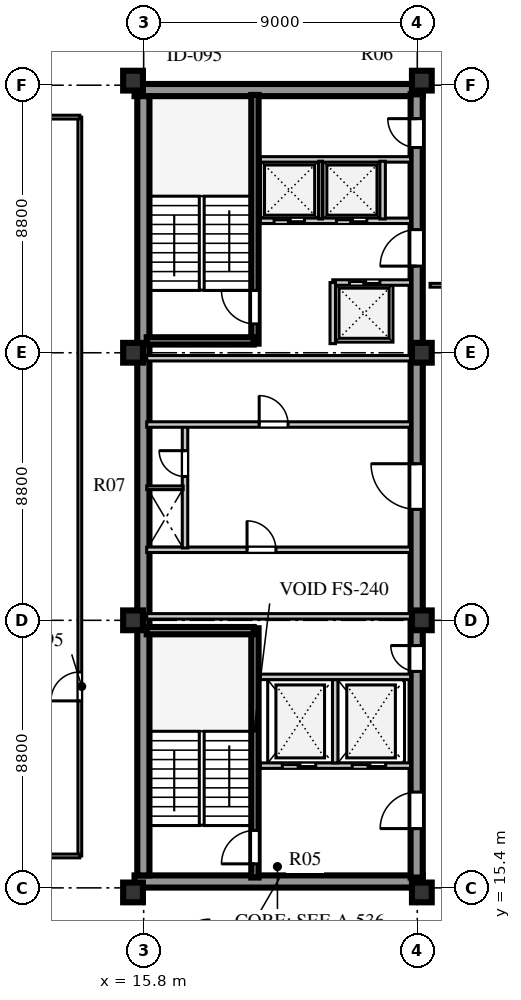
"""IFC4 building model, lengths in metres.
Left out: names, types, materials, properties, quantities, classifications, styles, units other than length and angle.
Written with IfcOpenShell. Run it as: python <this file> out.ifc"""

import sys

from ifc_helpers import new_model, si_unit, direction, frame, frame_2d, origin, origin_2d, place, context, subcontext, project, spatial, rectangle, extrude, element, fill, save


model = new_model("IFC4")
c1 = context("Model", 3, precision=1e-05, world=origin(), true_north=direction((0.0, 1.0)))
c2 = subcontext(c1, "Body", "Model", "MODEL_VIEW")
j1 = project(units=[si_unit("LENGTHUNIT", "METRE"), si_unit("PLANEANGLEUNIT", "RADIAN")], contexts=[c1])
p1 = place(None, origin())
s1 = spatial("IfcSite", under=j1, at=p1, CompositionType="ELEMENT")
p2 = place(p1, origin())
s2 = spatial("IfcBuilding", under=s1, at=p2, CompositionType="ELEMENT")
p3 = place(p2, frame((0.0, 0.0, 280.4)))
s3 = spatial("IfcBuildingStorey", under=s2, at=p3, CompositionType="ELEMENT", Elevation=280.4)
for number, where, z_axis, x_axis in (
    (1, (15.5, 15.61, 0.0), (0.0, 0.0, 1.0), (1.0, 0.0, 0.0)),
    (2, (15.5, 41.64, 0.0), (0.0, 0.0, 1.0), (1.0, 0.0, 0.0)),
):
    element("IfcWall", number, at=place(p3, frame(where, z_axis=z_axis, x_axis=x_axis)), inside=s3, PredefinedType="SHEAR", context=c2, shape_type="SweptSolid", body=[
        extrude(rectangle(XDim=9.48, YDim=0.4, at=frame_2d((4.74, 0.0))), origin(), (0.0, 0.0, 1.0), 3.66),
    ])
p4 = place(p3, frame((15.79, 15.81, 0.0), z_axis=(0.0, 0.0, 1.0), x_axis=(0.0, 1.0, 0.0)))
e3 = element("IfcWall", 3, at=p4, inside=s3, PredefinedType="SHEAR", context=c2, shape_type="SweptSolid", body=[
    extrude(rectangle(XDim=25.63, YDim=0.4, at=frame_2d((12.815, 0.0))), origin(), (0.0, 0.0, 1.0), 3.66),
])
p5 = place(p3, frame((24.78, 15.74, 0.0), z_axis=(0.0, 0.0, 1.0), x_axis=(0.0, 1.0, 0.0)))
e4 = element("IfcWall", 4, at=p5, inside=s3, PredefinedType="SHEAR", context=c2, shape_type="SweptSolid", body=[
    extrude(rectangle(XDim=25.76, YDim=0.4, at=frame_2d((12.88, 0.0))), origin(), (0.0, 0.0, 1.0), 3.66),
])
p6 = place(p5, frame((1.61, 0.0, 0.0)))
e5 = element("IfcOpeningElement", 5, at=p6, cuts=e4, PredefinedType="OPENING", context=c2, shape_type="SweptSolid", body=[
    extrude(rectangle(XDim=1.2, YDim=2.1, at=frame_2d((0.6, 1.05))), frame((0.0, 0.21, 0.0), z_axis=(0.0, -1.0, 0.0), x_axis=(1.0, 0.0, 0.0)), (0.0, 0.0, 1.0), 0.42),
])
p7 = place(p5, frame((6.78, 0.0, 0.0)))
e6 = element("IfcOpeningElement", 6, at=p7, cuts=e4, PredefinedType="OPENING", context=c2, shape_type="SweptSolid", body=[
    extrude(rectangle(XDim=0.85, YDim=2.06, at=frame_2d((0.425, 1.03))), frame((0.0, 0.21, 0.0), z_axis=(0.0, -1.0, 0.0), x_axis=(1.0, 0.0, 0.0)), (0.0, 0.0, 1.0), 0.42),
])
p8 = place(p5, frame((12.11, 0.0, 0.0)))
e7 = element("IfcOpeningElement", 7, at=p8, cuts=e4, PredefinedType="OPENING", context=c2, shape_type="SweptSolid", body=[
    extrude(rectangle(XDim=1.5, YDim=2.12, at=frame_2d((0.75, 1.06))), frame((0.0, 0.21, 0.0), z_axis=(0.0, -1.0, 0.0), x_axis=(1.0, 0.0, 0.0)), (0.0, 0.0, 1.0), 0.42),
])
p9 = place(p5, frame((20.11, 0.0, 0.0)))
e8 = element("IfcOpeningElement", 8, at=p9, cuts=e4, PredefinedType="OPENING", context=c2, shape_type="SweptSolid", body=[
    extrude(rectangle(XDim=1.2, YDim=2.12, at=frame_2d((0.6, 1.06))), frame((0.0, 0.21, 0.0), z_axis=(0.0, -1.0, 0.0), x_axis=(1.0, 0.0, 0.0)), (0.0, 0.0, 1.0), 0.42),
])
p10 = place(p5, frame((24.01, 0.0, 0.0)))
e9 = element("IfcOpeningElement", 9, at=p10, cuts=e4, PredefinedType="OPENING", context=c2, shape_type="SweptSolid", body=[
    extrude(rectangle(XDim=0.95, YDim=2.1, at=frame_2d((0.475, 1.05))), frame((0.0, 0.21, 0.0), z_axis=(0.0, -1.0, 0.0), x_axis=(1.0, 0.0, 0.0)), (0.0, 0.0, 1.0), 0.42),
])
for number, where, z_axis, x_axis in (
    (10, (15.45, 15.25, 0.0), (0.0, 0.0, 1.0), (1.0, 0.0, 0.0)),
    (11, (15.45, 24.2, 0.0), (0.0, 0.0, 1.0), (1.0, 0.0, 0.0)),
    (12, (15.45, 33.0, 0.0), (0.0, 0.0, 1.0), (1.0, 0.0, 0.0)),
    (13, (15.45, 41.95, 0.0), (0.0, 0.0, 1.0), (1.0, 0.0, 0.0)),
    (14, (24.95, 15.25, 0.0), (0.0, 0.0, 1.0), (1.0, 0.0, 0.0)),
    (15, (24.95, 24.2, 0.0), (0.0, 0.0, 1.0), (1.0, 0.0, 0.0)),
    (16, (24.95, 33.0, 0.0), (0.0, 0.0, 1.0), (1.0, 0.0, 0.0)),
    (17, (24.95, 41.95, 0.0), (0.0, 0.0, 1.0), (1.0, 0.0, 0.0)),
):
    element("IfcColumn", number, at=place(p3, frame(where, z_axis=z_axis, x_axis=x_axis)), inside=s3, PredefinedType="COLUMN", context=c2, shape_type="SweptSolid", body=[
        extrude(rectangle(XDim=0.65, YDim=0.65, at=origin_2d()), origin(), (0.0, 0.0, 1.0), 3.66),
    ])
p11 = place(p3, frame((19.46, 15.74, 0.0), z_axis=(0.0, 0.0, 1.0), x_axis=(0.0, 1.0, 0.0)))
e18 = element("IfcWall", 18, at=p11, inside=s3, PredefinedType="SHEAR", context=c2, shape_type="SweptSolid", body=[
    extrude(rectangle(XDim=8.2, YDim=0.24, at=frame_2d((4.1, 0.0))), origin(), (0.0, 0.0, 1.0), 3.9),
])
p12 = place(p11, frame((0.45, 0.0, 0.0)))
e19 = element("IfcOpeningElement", 19, at=p12, cuts=e18, PredefinedType="OPENING", context=c2, shape_type="SweptSolid", body=[
    extrude(rectangle(XDim=1.1, YDim=2.1, at=frame_2d((0.55, 1.05))), frame((0.0, 0.13, 0.0), z_axis=(0.0, -1.0, 0.0), x_axis=(1.0, 0.0, 0.0)), (0.0, 0.0, 1.0), 0.26),
])
p13 = place(p3, frame((15.9, 23.86, 0.0), z_axis=(0.0, 0.0, 1.0), x_axis=(1.0, 0.0, 0.0)))
e20 = element("IfcWall", 20, at=p13, inside=s3, PredefinedType="SHEAR", context=c2, shape_type="SweptSolid", body=[
    extrude(rectangle(XDim=3.52, YDim=0.24, at=frame_2d((1.76, 0.0))), origin(), (0.0, 0.0, 1.0), 3.9),
])
p14 = place(p3, frame((19.64, 19.42, 0.0), z_axis=(0.0, 0.0, 1.0), x_axis=(1.0, 0.0, 0.0)))
e21 = element("IfcWall", 21, at=p14, inside=s3, PredefinedType="SOLIDWALL", context=c2, shape_type="SweptSolid", body=[
    extrude(rectangle(XDim=4.94, YDim=0.18, at=frame_2d((2.47, 0.0))), origin(), (0.0, 0.0, 1.0), 3.66),
])
p15 = place(p14, frame((0.72, 0.0, 0.0)))
e22 = element("IfcOpeningElement", 22, at=p15, cuts=e21, PredefinedType="OPENING", context=c2, shape_type="SweptSolid", body=[
    extrude(rectangle(XDim=1.1, YDim=2.1, at=frame_2d((0.55, 1.05))), frame((0.0, 0.1, 0.0), z_axis=(0.0, -1.0, 0.0), x_axis=(1.0, 0.0, 0.0)), (0.0, 0.0, 1.0), 0.2),
])
p16 = place(p14, frame((3.02, 0.0, 0.0)))
e23 = element("IfcOpeningElement", 23, at=p16, cuts=e21, PredefinedType="OPENING", context=c2, shape_type="SweptSolid", body=[
    extrude(rectangle(XDim=1.1, YDim=2.1, at=frame_2d((0.55, 1.05))), frame((0.0, 0.1, 0.0), z_axis=(0.0, -1.0, 0.0), x_axis=(1.0, 0.0, 0.0)), (0.0, 0.0, 1.0), 0.2),
])
p17 = place(p3, frame((22.1, 19.51, 0.0), z_axis=(0.0, 0.0, 1.0), x_axis=(0.0, 1.0, 0.0)))
e24 = element("IfcWall", 24, at=p17, inside=s3, PredefinedType="SOLIDWALL", context=c2, shape_type="SweptSolid", body=[
    extrude(rectangle(XDim=2.74, YDim=0.18, at=frame_2d((1.37, 0.0))), origin(), (0.0, 0.0, 1.0), 3.66),
])
p18 = place(p3, frame((19.64, 22.34, 0.0), z_axis=(0.0, 0.0, 1.0), x_axis=(1.0, 0.0, 0.0)))
e25 = element("IfcWall", 25, at=p18, inside=s3, PredefinedType="SOLIDWALL", context=c2, shape_type="SweptSolid", body=[
    extrude(rectangle(XDim=4.94, YDim=0.18, at=frame_2d((2.47, 0.0))), origin(), (0.0, 0.0, 1.0), 3.66),
])
p19 = place(p3, frame((15.9, 26.52, 0.0), z_axis=(0.0, 0.0, 1.0), x_axis=(1.0, 0.0, 0.0)))
e26 = element("IfcWall", 26, at=p19, inside=s3, PredefinedType="SOLIDWALL", context=c2, shape_type="SweptSolid", body=[
    extrude(rectangle(XDim=8.68, YDim=0.18, at=frame_2d((4.34, 0.0))), origin(), (0.0, 0.0, 1.0), 3.66),
])
p20 = place(p19, frame((3.3, 0.0, 0.0)))
e27 = element("IfcOpeningElement", 27, at=p20, cuts=e26, PredefinedType="OPENING", context=c2, shape_type="SweptSolid", body=[
    extrude(rectangle(XDim=0.95, YDim=2.1, at=frame_2d((0.475, 1.05))), frame((0.0, 0.1, 0.0), z_axis=(0.0, -1.0, 0.0), x_axis=(1.0, 0.0, 0.0)), (0.0, 0.0, 1.0), 0.2),
])
p21 = place(p3, frame((15.9, 24.33, 0.0), z_axis=(0.0, 0.0, 1.0), x_axis=(1.0, 0.0, 0.0)))
e28 = element("IfcWall", 28, at=p21, inside=s3, PredefinedType="SOLIDWALL", context=c2, shape_type="SweptSolid", body=[
    extrude(rectangle(XDim=8.68, YDim=0.18, at=frame_2d((4.34, 0.0))), origin(), (0.0, 0.0, 1.0), 3.06),
])
p22 = place(p3, frame((17.16, 26.58, 0.0), z_axis=(0.0, 0.0, 1.0), x_axis=(0.0, 1.0, 0.0)))
e29 = element("IfcWall", 29, at=p22, inside=s3, PredefinedType="SOLIDWALL", context=c2, shape_type="SweptSolid", body=[
    extrude(rectangle(XDim=4.02, YDim=0.18, at=frame_2d((2.01, 0.0))), origin(), (0.0, 0.0, 1.0), 3.66),
])
p23 = place(p22, frame((2.35, 0.0, 0.0)))
e30 = element("IfcOpeningElement", 30, at=p23, cuts=e29, PredefinedType="OPENING", context=c2, shape_type="SweptSolid", body=[
    extrude(rectangle(XDim=0.85, YDim=2.06, at=frame_2d((0.425, 1.03))), frame((0.0, 0.1, 0.0), z_axis=(0.0, -1.0, 0.0), x_axis=(1.0, 0.0, 0.0)), (0.0, 0.0, 1.0), 0.2),
])
p24 = place(p3, frame((15.9, 28.56, 0.0), z_axis=(0.0, 0.0, 1.0), x_axis=(1.0, 0.0, 0.0)))
e31 = element("IfcWall", 31, at=p24, inside=s3, PredefinedType="PARTITIONING", context=c2, shape_type="SweptSolid", body=[
    extrude(rectangle(XDim=1.2, YDim=0.12, at=frame_2d((0.6, 0.0))), origin(), (0.0, 0.0, 1.0), 3.66),
])
p25 = place(p3, frame((15.9, 30.64, 0.0), z_axis=(0.0, 0.0, 1.0), x_axis=(1.0, 0.0, 0.0)))
e32 = element("IfcWall", 32, at=p25, inside=s3, PredefinedType="SOLIDWALL", context=c2, shape_type="SweptSolid", body=[
    extrude(rectangle(XDim=8.68, YDim=0.18, at=frame_2d((4.34, 0.0))), origin(), (0.0, 0.0, 1.0), 3.66),
])
p26 = place(p25, frame((3.7, 0.0, 0.0)))
e33 = element("IfcOpeningElement", 33, at=p26, cuts=e32, PredefinedType="OPENING", context=c2, shape_type="SweptSolid", body=[
    extrude(rectangle(XDim=0.95, YDim=2.1, at=frame_2d((0.475, 1.05))), frame((0.0, 0.1, 0.0), z_axis=(0.0, -1.0, 0.0), x_axis=(1.0, 0.0, 0.0)), (0.0, 0.0, 1.0), 0.2),
])
p27 = place(p3, frame((15.9, 32.82, 0.0), z_axis=(0.0, 0.0, 1.0), x_axis=(1.0, 0.0, 0.0)))
e34 = element("IfcWall", 34, at=p27, inside=s3, PredefinedType="SOLIDWALL", context=c2, shape_type="SweptSolid", body=[
    extrude(rectangle(XDim=8.68, YDim=0.18, at=frame_2d((4.34, 0.0))), origin(), (0.0, 0.0, 1.0), 3.06),
])
p28 = place(p3, frame((19.46, 33.3, 0.0), z_axis=(0.0, 0.0, 1.0), x_axis=(0.0, 1.0, 0.0)))
e35 = element("IfcWall", 35, at=p28, inside=s3, PredefinedType="SHEAR", context=c2, shape_type="SweptSolid", body=[
    extrude(rectangle(XDim=8.18, YDim=0.24, at=frame_2d((4.09, 0.0))), origin(), (0.0, 0.0, 1.0), 3.9),
])
p29 = place(p28, frame((0.65, 0.0, 0.0)))
e36 = element("IfcOpeningElement", 36, at=p29, cuts=e35, PredefinedType="OPENING", context=c2, shape_type="SweptSolid", body=[
    extrude(rectangle(XDim=1.1, YDim=2.1, at=frame_2d((0.55, 1.05))), frame((0.0, 0.13, 0.0), z_axis=(0.0, -1.0, 0.0), x_axis=(1.0, 0.0, 0.0)), (0.0, 0.0, 1.0), 0.26),
])
p30 = place(p3, frame((15.9, 33.39, 0.0), z_axis=(0.0, 0.0, 1.0), x_axis=(1.0, 0.0, 0.0)))
e37 = element("IfcWall", 37, at=p30, inside=s3, PredefinedType="SHEAR", context=c2, shape_type="SweptSolid", body=[
    extrude(rectangle(XDim=3.52, YDim=0.24, at=frame_2d((1.76, 0.0))), origin(), (0.0, 0.0, 1.0), 3.9),
])
p31 = place(p3, frame((22.02, 35.31, 0.0), z_axis=(0.0, 0.0, 1.0), x_axis=(1.0, 0.0, 0.0)))
e38 = element("IfcWall", 38, at=p31, inside=s3, PredefinedType="SOLIDWALL", context=c2, shape_type="SweptSolid", body=[
    extrude(rectangle(XDim=2.56, YDim=0.18, at=frame_2d((1.28, 0.0))), origin(), (0.0, 0.0, 1.0), 3.66),
])
p32 = place(p31, frame((0.55, 0.0, 0.0)))
e39 = element("IfcOpeningElement", 39, at=p32, cuts=e38, PredefinedType="OPENING", context=c2, shape_type="SweptSolid", body=[
    extrude(rectangle(XDim=1.0, YDim=2.1, at=frame_2d((0.5, 1.05))), frame((0.0, 0.1, 0.0), z_axis=(0.0, -1.0, 0.0), x_axis=(1.0, 0.0, 0.0)), (0.0, 0.0, 1.0), 0.2),
])
p33 = place(p3, frame((22.02, 33.3, 0.0), z_axis=(0.0, 0.0, 1.0), x_axis=(0.0, 1.0, 0.0)))
e40 = element("IfcWall", 40, at=p33, inside=s3, PredefinedType="SOLIDWALL", context=c2, shape_type="SweptSolid", body=[
    extrude(rectangle(XDim=2.01, YDim=0.18, at=frame_2d((1.005, 0.0))), origin(), (0.0, 0.0, 1.0), 3.66),
])
p34 = place(p3, frame((19.64, 37.34, 0.0), z_axis=(0.0, 0.0, 1.0), x_axis=(1.0, 0.0, 0.0)))
e41 = element("IfcWall", 41, at=p34, inside=s3, PredefinedType="SOLIDWALL", context=c2, shape_type="SweptSolid", body=[
    extrude(rectangle(XDim=4.94, YDim=0.18, at=frame_2d((2.47, 0.0))), origin(), (0.0, 0.0, 1.0), 3.66),
])
p35 = place(p34, frame((0.45, 0.0, 0.0)))
e42 = element("IfcOpeningElement", 42, at=p35, cuts=e41, PredefinedType="OPENING", context=c2, shape_type="SweptSolid", body=[
    extrude(rectangle(XDim=1.0, YDim=2.1, at=frame_2d((0.5, 1.05))), frame((0.0, 0.1, 0.0), z_axis=(0.0, -1.0, 0.0), x_axis=(1.0, 0.0, 0.0)), (0.0, 0.0, 1.0), 0.2),
])
p36 = place(p34, frame((2.5, 0.0, 0.0)))
e43 = element("IfcOpeningElement", 43, at=p36, cuts=e41, PredefinedType="OPENING", context=c2, shape_type="SweptSolid", body=[
    extrude(rectangle(XDim=1.0, YDim=2.1, at=frame_2d((0.5, 1.05))), frame((0.0, 0.1, 0.0), z_axis=(0.0, -1.0, 0.0), x_axis=(1.0, 0.0, 0.0)), (0.0, 0.0, 1.0), 0.2),
])
p37 = place(p3, frame((19.64, 39.36, 0.0), z_axis=(0.0, 0.0, 1.0), x_axis=(1.0, 0.0, 0.0)))
e44 = element("IfcWall", 44, at=p37, inside=s3, PredefinedType="SOLIDWALL", context=c2, shape_type="SweptSolid", body=[
    extrude(rectangle(XDim=4.94, YDim=0.18, at=frame_2d((2.47, 0.0))), origin(), (0.0, 0.0, 1.0), 3.66),
])
p38 = place(p3, frame((21.62, 37.4, 0.0), z_axis=(0.0, 0.0, 1.0), x_axis=(0.0, 1.0, 0.0)))
e45 = element("IfcWall", 45, at=p38, inside=s3, PredefinedType="PARTITIONING", context=c2, shape_type="SweptSolid", body=[
    extrude(rectangle(XDim=1.9, YDim=0.12, at=frame_2d((0.95, 0.0))), origin(), (0.0, 0.0, 1.0), 3.66),
])
p39 = place(p3, frame((23.66, 37.4, 0.0), z_axis=(0.0, 0.0, 1.0), x_axis=(0.0, 1.0, 0.0)))
e46 = element("IfcWall", 46, at=p39, inside=s3, PredefinedType="SOLIDWALL", context=c2, shape_type="SweptSolid", body=[
    extrude(rectangle(XDim=1.9, YDim=0.18, at=frame_2d((0.95, 0.0))), origin(), (0.0, 0.0, 1.0), 3.66),
])
p40 = place(p3, frame((25.22, 35.22, 0.0), z_axis=(0.0, 0.0, 1.0), x_axis=(1.0, 0.0, 0.0)))
e47 = element("IfcWall", 47, at=p40, inside=s3, PredefinedType="PLUMBINGWALL", context=c2, shape_type="SweptSolid", body=[
    extrude(rectangle(XDim=9.5, YDim=0.125, at=frame_2d((4.75, 0.0))), origin(), (0.0, 0.0, 1.0), 3.66),
])
p41 = place(p40, frame((1.8, 0.0, 0.0)))
e48 = element("IfcOpeningElement", 48, at=p41, cuts=e47, PredefinedType="OPENING", context=c2, shape_type="SweptSolid", body=[
    extrude(rectangle(XDim=1.1, YDim=2.08, at=frame_2d((0.55, 1.04))), frame((0.0, 0.073, 0.0), z_axis=(0.0, -1.0, 0.0), x_axis=(1.0, 0.0, 0.0)), (0.0, 0.0, 1.0), 0.145),
])
p42 = place(p3, frame((13.7, 16.45, 0.0), z_axis=(0.0, 0.0, 1.0), x_axis=(0.0, 1.0, 0.0)))
e49 = element("IfcWall", 49, at=p42, inside=s3, PredefinedType="PLUMBINGWALL", context=c2, shape_type="SweptSolid", body=[
    extrude(rectangle(XDim=24.3, YDim=0.125, at=frame_2d((12.15, 0.0))), origin(), (0.0, 0.0, 1.0), 3.66),
])
p43 = place(p42, frame((5.1, 0.0, 0.0)))
e50 = element("IfcOpeningElement", 50, at=p43, cuts=e49, PredefinedType="OPENING", context=c2, shape_type="SweptSolid", body=[
    extrude(rectangle(XDim=0.95, YDim=2.08, at=frame_2d((0.475, 1.04))), frame((0.0, 0.073, 0.0), z_axis=(0.0, -1.0, 0.0), x_axis=(1.0, 0.0, 0.0)), (0.0, 0.0, 1.0), 0.145),
])
for number, where, z_axis, x_axis in (
    (51, (10.68, 16.45, 0.0), (0.0, 0.0, 1.0), (1.0, 0.0, 0.0)),
    (52, (10.68, 40.75, 0.0), (0.0, 0.0, 1.0), (1.0, 0.0, 0.0)),
):
    element("IfcWall", number, at=place(p3, frame(where, z_axis=z_axis, x_axis=x_axis)), inside=s3, PredefinedType="PLUMBINGWALL", context=c2, shape_type="SweptSolid", body=[
        extrude(rectangle(XDim=3.02, YDim=0.125, at=frame_2d((1.51, 0.0))), origin(), (0.0, 0.0, 1.0), 3.66),
    ])
p44 = place(p12, origin())
e53 = element("IfcDoor", 53, at=p44, inside=s3, OperationType="SINGLE_SWING_LEFT", PredefinedType="DOOR", context=c2, shape_type="SweptSolid", body=[
    extrude(rectangle(XDim=1.1, YDim=2.1, at=frame_2d((0.55, 1.05))), frame((0.0, 0.025, 0.0), z_axis=(0.0, -1.0, 0.0), x_axis=(1.0, 0.0, 0.0)), (0.0, 0.0, 1.0), 0.05),
])
fill(e19, e53)
p45 = place(p15, origin())
e54 = element("IfcDoor", 54, at=p45, inside=s3, OperationType="DOUBLE_DOOR_SLIDING", PredefinedType="DOOR", context=c2, shape_type="SweptSolid", body=[
    extrude(rectangle(XDim=1.1, YDim=2.1, at=frame_2d((0.55, 1.05))), frame((0.0, 0.025, 0.0), z_axis=(0.0, -1.0, 0.0), x_axis=(1.0, 0.0, 0.0)), (0.0, 0.0, 1.0), 0.05),
])
fill(e22, e54)
p46 = place(p16, origin())
e55 = element("IfcDoor", 55, at=p46, inside=s3, OperationType="DOUBLE_DOOR_SLIDING", PredefinedType="DOOR", context=c2, shape_type="SweptSolid", body=[
    extrude(rectangle(XDim=1.1, YDim=2.1, at=frame_2d((0.55, 1.05))), frame((0.0, 0.025, 0.0), z_axis=(0.0, -1.0, 0.0), x_axis=(1.0, 0.0, 0.0)), (0.0, 0.0, 1.0), 0.05),
])
fill(e23, e55)
p47 = place(p6, frame((1.2, 0.0, 0.0), z_axis=(0.0, 0.0, 1.0), x_axis=(-1.0, 0.0, 0.0)))
e56 = element("IfcDoor", 56, at=p47, inside=s3, OperationType="SINGLE_SWING_RIGHT", PredefinedType="DOOR", context=c2, shape_type="SweptSolid", body=[
    extrude(rectangle(XDim=1.2, YDim=2.1, at=frame_2d((0.6, 1.05))), frame((0.0, 0.025, 0.0), z_axis=(0.0, -1.0, 0.0), x_axis=(1.0, 0.0, 0.0)), (0.0, 0.0, 1.0), 0.05),
])
fill(e5, e56)
p48 = place(p7, frame((0.85, 0.0, 0.0), z_axis=(0.0, 0.0, 1.0), x_axis=(-1.0, 0.0, 0.0)))
e57 = element("IfcDoor", 57, at=p48, inside=s3, OperationType="SINGLE_SWING_LEFT", PredefinedType="DOOR", context=c2, shape_type="SweptSolid", body=[
    extrude(rectangle(XDim=0.85, YDim=2.06, at=frame_2d((0.425, 1.03))), frame((0.0, 0.025, 0.0), z_axis=(0.0, -1.0, 0.0), x_axis=(1.0, 0.0, 0.0)), (0.0, 0.0, 1.0), 0.05),
])
fill(e6, e57)
p49 = place(p20, origin())
e58 = element("IfcDoor", 58, at=p49, inside=s3, OperationType="SINGLE_SWING_LEFT", PredefinedType="DOOR", context=c2, shape_type="SweptSolid", body=[
    extrude(rectangle(XDim=0.95, YDim=2.1, at=frame_2d((0.475, 1.05))), frame((0.0, 0.025, 0.0), z_axis=(0.0, -1.0, 0.0), x_axis=(1.0, 0.0, 0.0)), (0.0, 0.0, 1.0), 0.05),
])
fill(e27, e58)
p50 = place(p23, origin())
e59 = element("IfcDoor", 59, at=p50, inside=s3, OperationType="SINGLE_SWING_RIGHT", PredefinedType="DOOR", context=c2, shape_type="SweptSolid", body=[
    extrude(rectangle(XDim=0.85, YDim=2.06, at=frame_2d((0.425, 1.03))), frame((0.0, 0.025, 0.0), z_axis=(0.0, -1.0, 0.0), x_axis=(1.0, 0.0, 0.0)), (0.0, 0.0, 1.0), 0.05),
])
fill(e30, e59)
p51 = place(p8, frame((1.5, 0.0, 0.0), z_axis=(0.0, 0.0, 1.0), x_axis=(-1.0, 0.0, 0.0)))
e60 = element("IfcDoor", 60, at=p51, inside=s3, OperationType="SINGLE_SWING_LEFT", PredefinedType="DOOR", context=c2, shape_type="SweptSolid", body=[
    extrude(rectangle(XDim=1.5, YDim=2.12, at=frame_2d((0.75, 1.06))), frame((0.0, 0.025, 0.0), z_axis=(0.0, -1.0, 0.0), x_axis=(1.0, 0.0, 0.0)), (0.0, 0.0, 1.0), 0.05),
])
fill(e7, e60)
p52 = place(p26, frame((0.95, 0.0, 0.0), z_axis=(0.0, 0.0, 1.0), x_axis=(-1.0, 0.0, 0.0)))
e61 = element("IfcDoor", 61, at=p52, inside=s3, OperationType="SINGLE_SWING_RIGHT", PredefinedType="DOOR", context=c2, shape_type="SweptSolid", body=[
    extrude(rectangle(XDim=0.95, YDim=2.1, at=frame_2d((0.475, 1.05))), frame((0.0, 0.025, 0.0), z_axis=(0.0, -1.0, 0.0), x_axis=(1.0, 0.0, 0.0)), (0.0, 0.0, 1.0), 0.05),
])
fill(e33, e61)
p53 = place(p29, origin())
e62 = element("IfcDoor", 62, at=p53, inside=s3, OperationType="SINGLE_SWING_RIGHT", PredefinedType="DOOR", context=c2, shape_type="SweptSolid", body=[
    extrude(rectangle(XDim=1.1, YDim=2.1, at=frame_2d((0.55, 1.05))), frame((0.0, 0.025, 0.0), z_axis=(0.0, -1.0, 0.0), x_axis=(1.0, 0.0, 0.0)), (0.0, 0.0, 1.0), 0.05),
])
fill(e36, e62)
p54 = place(p9, frame((1.2, 0.0, 0.0), z_axis=(0.0, 0.0, 1.0), x_axis=(-1.0, 0.0, 0.0)))
e63 = element("IfcDoor", 63, at=p54, inside=s3, OperationType="SINGLE_SWING_RIGHT", PredefinedType="DOOR", context=c2, shape_type="SweptSolid", body=[
    extrude(rectangle(XDim=1.2, YDim=2.12, at=frame_2d((0.6, 1.06))), frame((0.0, 0.025, 0.0), z_axis=(0.0, -1.0, 0.0), x_axis=(1.0, 0.0, 0.0)), (0.0, 0.0, 1.0), 0.05),
])
fill(e8, e63)
p55 = place(p35, frame((1.0, 0.0, 0.0), z_axis=(0.0, 0.0, 1.0), x_axis=(-1.0, 0.0, 0.0)))
e64 = element("IfcDoor", 64, at=p55, inside=s3, OperationType="DOUBLE_DOOR_SLIDING", PredefinedType="DOOR", context=c2, shape_type="SweptSolid", body=[
    extrude(rectangle(XDim=1.0, YDim=2.1, at=frame_2d((0.5, 1.05))), frame((0.0, 0.025, 0.0), z_axis=(0.0, -1.0, 0.0), x_axis=(1.0, 0.0, 0.0)), (0.0, 0.0, 1.0), 0.05),
])
fill(e42, e64)
p56 = place(p36, frame((1.0, 0.0, 0.0), z_axis=(0.0, 0.0, 1.0), x_axis=(-1.0, 0.0, 0.0)))
e65 = element("IfcDoor", 65, at=p56, inside=s3, OperationType="DOUBLE_DOOR_SLIDING", PredefinedType="DOOR", context=c2, shape_type="SweptSolid", body=[
    extrude(rectangle(XDim=1.0, YDim=2.1, at=frame_2d((0.5, 1.05))), frame((0.0, 0.025, 0.0), z_axis=(0.0, -1.0, 0.0), x_axis=(1.0, 0.0, 0.0)), (0.0, 0.0, 1.0), 0.05),
])
fill(e43, e65)
p57 = place(p32, origin())
e66 = element("IfcDoor", 66, at=p57, inside=s3, OperationType="DOUBLE_DOOR_SLIDING", PredefinedType="DOOR", context=c2, shape_type="SweptSolid", body=[
    extrude(rectangle(XDim=1.0, YDim=2.1, at=frame_2d((0.5, 1.05))), frame((0.0, 0.025, 0.0), z_axis=(0.0, -1.0, 0.0), x_axis=(1.0, 0.0, 0.0)), (0.0, 0.0, 1.0), 0.05),
])
fill(e39, e66)
p58 = place(p10, frame((0.95, 0.0, 0.0), z_axis=(0.0, 0.0, 1.0), x_axis=(-1.0, 0.0, 0.0)))
e67 = element("IfcDoor", 67, at=p58, inside=s3, OperationType="SINGLE_SWING_LEFT", PredefinedType="DOOR", context=c2, shape_type="SweptSolid", body=[
    extrude(rectangle(XDim=0.95, YDim=2.1, at=frame_2d((0.475, 1.05))), frame((0.0, 0.025, 0.0), z_axis=(0.0, -1.0, 0.0), x_axis=(1.0, 0.0, 0.0)), (0.0, 0.0, 1.0), 0.05),
])
fill(e9, e67)
p59 = place(p43, origin())
e68 = element("IfcDoor", 68, at=p59, inside=s3, OperationType="SINGLE_SWING_LEFT", PredefinedType="DOOR", context=c2, shape_type="SweptSolid", body=[
    extrude(rectangle(XDim=0.95, YDim=2.08, at=frame_2d((0.475, 1.04))), frame((0.0, 0.025, 0.0), z_axis=(0.0, -1.0, 0.0), x_axis=(1.0, 0.0, 0.0)), (0.0, 0.0, 1.0), 0.05),
])
fill(e50, e68)
save(model, sys.argv[1])
